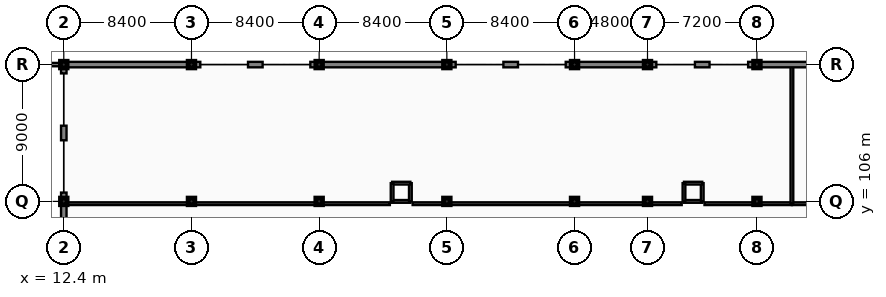
"""IFC4 building model, lengths in metres.
Left out: names, types, materials, properties, quantities, classifications, styles, units other than length and angle.
Written with IfcOpenShell. Run it as: python <this file> out.ifc"""

import sys

from ifc_helpers import new_model, si_unit, direction, frame, frame_2d, origin, origin_2d, place, context, subcontext, project, spatial, rectangle, extrude, element, fill, save


model = new_model("IFC4")
c1 = context("Model", 3, precision=1e-05, world=origin(), true_north=direction((0.0, 1.0)))
c2 = subcontext(c1, "Body", "Model", "MODEL_VIEW")
j1 = project(units=[si_unit("LENGTHUNIT", "METRE"), si_unit("PLANEANGLEUNIT", "RADIAN")], contexts=[c1])
p1 = place(None, origin())
s1 = spatial("IfcSite", under=j1, at=p1, CompositionType="ELEMENT")
p2 = place(p1, origin())
s2 = spatial("IfcBuilding", under=s1, at=p2, CompositionType="ELEMENT")
p3 = place(p2, frame((0.0, 0.0, 9.6)))
s3 = spatial("IfcBuildingStorey", under=s2, at=p3, CompositionType="ELEMENT", Elevation=9.6)
for number, where, z_axis, x_axis in (
    (1, (12.4, 106.0, 0.0), (0.0, 0.0, 1.0), (1.0, 0.0, 0.0)),
    (2, (12.4, 115.0, 0.0), (0.0, 0.0, 1.0), (1.0, 0.0, 0.0)),
    (3, (20.8, 106.0, 0.0), (0.0, 0.0, 1.0), (1.0, 0.0, 0.0)),
    (4, (20.8, 115.0, 0.0), (0.0, 0.0, 1.0), (1.0, 0.0, 0.0)),
    (5, (29.2, 106.0, 0.0), (0.0, 0.0, 1.0), (1.0, 0.0, 0.0)),
    (6, (29.2, 115.0, 0.0), (0.0, 0.0, 1.0), (1.0, 0.0, 0.0)),
    (7, (37.6, 106.0, 0.0), (0.0, 0.0, 1.0), (1.0, 0.0, 0.0)),
    (8, (37.6, 115.0, 0.0), (0.0, 0.0, 1.0), (1.0, 0.0, 0.0)),
    (9, (46.0, 106.0, 0.0), (0.0, 0.0, 1.0), (1.0, 0.0, 0.0)),
    (10, (46.0, 115.0, 0.0), (0.0, 0.0, 1.0), (1.0, 0.0, 0.0)),
    (11, (50.8, 106.0, 0.0), (0.0, 0.0, 1.0), (1.0, 0.0, 0.0)),
    (12, (50.8, 115.0, 0.0), (0.0, 0.0, 1.0), (1.0, 0.0, 0.0)),
    (13, (58.0, 106.0, 0.0), (0.0, 0.0, 1.0), (1.0, 0.0, 0.0)),
    (14, (58.0, 115.0, 0.0), (0.0, 0.0, 1.0), (1.0, 0.0, 0.0)),
):
    element("IfcColumn", number, at=place(p3, frame(where, z_axis=z_axis, x_axis=x_axis)), inside=s3, PredefinedType="COLUMN", context=c2, shape_type="SweptSolid", body=[
        extrude(rectangle(XDim=0.44, YDim=0.44, at=origin_2d()), origin(), (0.0, 0.0, 1.0), 4.2),
    ])
p4 = place(p3, frame((12.54, 105.85, 0.0), z_axis=(0.0, 0.0, 1.0), x_axis=(1.0, 0.0, 0.0)))
e15 = element("IfcWall", 15, at=p4, inside=s3, PredefinedType="PARTITIONING", context=c2, shape_type="SweptSolid", body=[
    extrude(rectangle(XDim=21.31, YDim=0.18, at=frame_2d((10.655, 0.0))), origin(), (0.0, 0.0, 1.0), 3.31),
])
p5 = place(p4, frame((8.87, 0.0, -0.01)))
e16 = element("IfcOpeningElement", 16, at=p5, cuts=e15, PredefinedType="OPENING", context=c2, shape_type="SweptSolid", body=[
    extrude(rectangle(XDim=1.6, YDim=2.21, at=frame_2d((0.8, 1.105))), frame((0.0, 0.1, 0.0), z_axis=(0.0, -1.0, 0.0), x_axis=(1.0, 0.0, 0.0)), (0.0, 0.0, 1.0), 0.2),
])
p6 = place(p3, frame((35.35, 105.85, 0.0), z_axis=(0.0, 0.0, 1.0), x_axis=(1.0, 0.0, 0.0)))
e17 = element("IfcWall", 17, at=p6, inside=s3, PredefinedType="PARTITIONING", context=c2, shape_type="SweptSolid", body=[
    extrude(rectangle(XDim=17.7, YDim=0.18, at=frame_2d((8.85, 0.0))), origin(), (0.0, 0.0, 1.0), 3.25),
])
p7 = place(p3, frame((54.55, 105.85, 0.0), z_axis=(0.0, 0.0, 1.0), x_axis=(1.0, 0.0, 0.0)))
e18 = element("IfcWall", 18, at=p7, inside=s3, PredefinedType="PARTITIONING", context=c2, shape_type="SweptSolid", body=[
    extrude(rectangle(XDim=5.75, YDim=0.18, at=frame_2d((2.875, 0.0))), origin(), (0.0, 0.0, 1.0), 3.25),
])
p8 = place(p3, frame((60.3, 105.85, 0.0), z_axis=(0.0, 0.0, 1.0), x_axis=(1.0, 0.0, 0.0)))
e19 = element("IfcWall", 19, at=p8, inside=s3, PredefinedType="PARTITIONING", context=c2, shape_type="SweptSolid", body=[
    extrude(rectangle(XDim=15.1, YDim=0.18, at=frame_2d((7.55, 0.0))), origin(), (0.0, 0.0, 1.0), 3.25),
])
p9 = place(p8, frame((7.05, 0.0, -0.01)))
e20 = element("IfcOpeningElement", 20, at=p9, cuts=e19, PredefinedType="OPENING", context=c2, shape_type="SweptSolid", body=[
    extrude(rectangle(XDim=1.0, YDim=2.16, at=frame_2d((0.5, 1.08))), frame((0.0, 0.1, 0.0), z_axis=(0.0, -1.0, 0.0), x_axis=(1.0, 0.0, 0.0)), (0.0, 0.0, 1.0), 0.2),
])
p10 = place(p3, frame((60.3, 105.85, 0.0), z_axis=(0.0, 0.0, 1.0), x_axis=(0.0, 1.0, 0.0)))
e21 = element("IfcWall", 21, at=p10, inside=s3, PredefinedType="PARTITIONING", context=c2, shape_type="SweptSolid", body=[
    extrude(rectangle(XDim=9.01, YDim=0.18, at=frame_2d((4.505, 0.0))), origin(), (0.0, 0.0, 1.0), 3.25),
])
p11 = place(p3, frame((20.8, 115.0, 0.0), z_axis=(0.0, 0.0, 1.0), x_axis=(-1.0, 0.0, 0.0)))
e22 = element("IfcWall", 22, at=p11, inside=s3, PredefinedType="SOLIDWALL", context=c2, shape_type="SweptSolid", body=[
    extrude(rectangle(XDim=8.4, YDim=0.36, at=frame_2d((4.2, 0.0))), origin(), (0.0, 0.0, 1.0), 3.31),
])
p12 = place(p11, frame((0.46, 0.0, 0.75)))
e23 = element("IfcOpeningElement", 23, at=p12, cuts=e22, PredefinedType="OPENING", context=c2, shape_type="SweptSolid", body=[
    extrude(rectangle(XDim=1.55, YDim=2.4, at=frame_2d((0.775, 1.2))), frame((0.0, 0.19, 0.0), z_axis=(0.0, -1.0, 0.0), x_axis=(1.0, 0.0, 0.0)), (0.0, 0.0, 1.0), 0.38),
])
p13 = place(p11, frame((6.26, 0.0, 0.75)))
e24 = element("IfcOpeningElement", 24, at=p13, cuts=e22, PredefinedType="OPENING", context=c2, shape_type="SweptSolid", body=[
    extrude(rectangle(XDim=1.55, YDim=2.4, at=frame_2d((0.775, 1.2))), frame((0.0, 0.19, 0.0), z_axis=(0.0, -1.0, 0.0), x_axis=(1.0, 0.0, 0.0)), (0.0, 0.0, 1.0), 0.38),
])
p14 = place(p3, frame((25.48, 115.0, 0.0), z_axis=(0.0, 0.0, 1.0), x_axis=(-1.0, 0.0, 0.0)))
e25 = element("IfcWall", 25, at=p14, inside=s3, PredefinedType="SOLIDWALL", context=c2, shape_type="SweptSolid", body=[
    extrude(rectangle(XDim=0.96, YDim=0.36, at=frame_2d((0.48, 0.0))), origin(), (0.0, 0.0, 1.0), 3.31),
])
for number, where, z_axis, x_axis in (
    (26, (29.07, 115.0, 0.0), (0.0, 0.0, 1.0), (-1.0, 0.0, 0.0)),
    (27, (21.38, 115.0, 0.0), (0.0, 0.0, 1.0), (-1.0, 0.0, 0.0)),
):
    element("IfcWall", number, at=place(p3, frame(where, z_axis=z_axis, x_axis=x_axis)), inside=s3, PredefinedType="SOLIDWALL", context=c2, shape_type="SweptSolid", body=[
        extrude(rectangle(XDim=0.45, YDim=0.36, at=frame_2d((0.225, 0.0))), origin(), (0.0, 0.0, 1.0), 3.31),
    ])
p15 = place(p3, frame((37.6, 115.0, 0.0), z_axis=(0.0, 0.0, 1.0), x_axis=(-1.0, 0.0, 0.0)))
e28 = element("IfcWall", 28, at=p15, inside=s3, PredefinedType="SOLIDWALL", context=c2, shape_type="SweptSolid", body=[
    extrude(rectangle(XDim=8.4, YDim=0.36, at=frame_2d((4.2, 0.0))), origin(), (0.0, 0.0, 1.0), 3.31),
])
p16 = place(p15, frame((0.46, 0.0, 0.75)))
e29 = element("IfcOpeningElement", 29, at=p16, cuts=e28, PredefinedType="OPENING", context=c2, shape_type="SweptSolid", body=[
    extrude(rectangle(XDim=1.55, YDim=2.4, at=frame_2d((0.775, 1.2))), frame((0.0, 0.19, 0.0), z_axis=(0.0, -1.0, 0.0), x_axis=(1.0, 0.0, 0.0)), (0.0, 0.0, 1.0), 0.38),
])
p17 = place(p15, frame((6.26, 0.0, 0.75)))
e30 = element("IfcOpeningElement", 30, at=p17, cuts=e28, PredefinedType="OPENING", context=c2, shape_type="SweptSolid", body=[
    extrude(rectangle(XDim=1.55, YDim=2.4, at=frame_2d((0.775, 1.2))), frame((0.0, 0.19, 0.0), z_axis=(0.0, -1.0, 0.0), x_axis=(1.0, 0.0, 0.0)), (0.0, 0.0, 1.0), 0.38),
])
p18 = place(p3, frame((42.28, 115.0, 0.0), z_axis=(0.0, 0.0, 1.0), x_axis=(-1.0, 0.0, 0.0)))
e31 = element("IfcWall", 31, at=p18, inside=s3, PredefinedType="SOLIDWALL", context=c2, shape_type="SweptSolid", body=[
    extrude(rectangle(XDim=0.96, YDim=0.36, at=frame_2d((0.48, 0.0))), origin(), (0.0, 0.0, 1.0), 3.45),
])
p19 = place(p3, frame((45.87, 115.0, 0.0), z_axis=(0.0, 0.0, 1.0), x_axis=(-1.0, 0.0, 0.0)))
e32 = element("IfcWall", 32, at=p19, inside=s3, PredefinedType="SOLIDWALL", context=c2, shape_type="SweptSolid", body=[
    extrude(rectangle(XDim=0.45, YDim=0.36, at=frame_2d((0.225, 0.0))), origin(), (0.0, 0.0, 1.0), 3.45),
])
p20 = place(p3, frame((38.18, 115.0, 0.0), z_axis=(0.0, 0.0, 1.0), x_axis=(-1.0, 0.0, 0.0)))
e33 = element("IfcWall", 33, at=p20, inside=s3, PredefinedType="SOLIDWALL", context=c2, shape_type="SweptSolid", body=[
    extrude(rectangle(XDim=0.45, YDim=0.36, at=frame_2d((0.225, 0.0))), origin(), (0.0, 0.0, 1.0), 3.45),
])
p21 = place(p3, frame((50.8, 115.0, 0.0), z_axis=(0.0, 0.0, 1.0), x_axis=(-1.0, 0.0, 0.0)))
e34 = element("IfcWall", 34, at=p21, inside=s3, PredefinedType="SOLIDWALL", context=c2, shape_type="SweptSolid", body=[
    extrude(rectangle(XDim=4.8, YDim=0.36, at=frame_2d((2.4, 0.0))), origin(), (0.0, 0.0, 1.0), 3.45),
])
p22 = place(p21, frame((0.46, 0.0, 0.75)))
e35 = element("IfcOpeningElement", 35, at=p22, cuts=e34, PredefinedType="OPENING", context=c2, shape_type="SweptSolid", body=[
    extrude(rectangle(XDim=1.55, YDim=2.4, at=frame_2d((0.775, 1.2))), frame((0.0, 0.19, 0.0), z_axis=(0.0, -1.0, 0.0), x_axis=(1.0, 0.0, 0.0)), (0.0, 0.0, 1.0), 0.38),
])
p23 = place(p21, frame((2.66, 0.0, 0.75)))
e36 = element("IfcOpeningElement", 36, at=p23, cuts=e34, PredefinedType="OPENING", context=c2, shape_type="SweptSolid", body=[
    extrude(rectangle(XDim=1.55, YDim=2.4, at=frame_2d((0.775, 1.2))), frame((0.0, 0.19, 0.0), z_axis=(0.0, -1.0, 0.0), x_axis=(1.0, 0.0, 0.0)), (0.0, 0.0, 1.0), 0.38),
])
p24 = place(p3, frame((54.88, 115.0, 0.0), z_axis=(0.0, 0.0, 1.0), x_axis=(-1.0, 0.0, 0.0)))
e37 = element("IfcWall", 37, at=p24, inside=s3, PredefinedType="SOLIDWALL", context=c2, shape_type="SweptSolid", body=[
    extrude(rectangle(XDim=0.96, YDim=0.36, at=frame_2d((0.48, 0.0))), origin(), (0.0, 0.0, 1.0), 3.45),
])
p25 = place(p3, frame((57.87, 115.0, 0.0), z_axis=(0.0, 0.0, 1.0), x_axis=(-1.0, 0.0, 0.0)))
e38 = element("IfcWall", 38, at=p25, inside=s3, PredefinedType="SOLIDWALL", context=c2, shape_type="SweptSolid", body=[
    extrude(rectangle(XDim=0.45, YDim=0.36, at=frame_2d((0.225, 0.0))), origin(), (0.0, 0.0, 1.0), 3.45),
])
p26 = place(p3, frame((51.38, 115.0, 0.0), z_axis=(0.0, 0.0, 1.0), x_axis=(-1.0, 0.0, 0.0)))
e39 = element("IfcWall", 39, at=p26, inside=s3, PredefinedType="SOLIDWALL", context=c2, shape_type="SweptSolid", body=[
    extrude(rectangle(XDim=0.45, YDim=0.36, at=frame_2d((0.225, 0.0))), origin(), (0.0, 0.0, 1.0), 3.45),
])
p27 = place(p3, frame((65.2, 115.0, 0.0), z_axis=(0.0, 0.0, 1.0), x_axis=(-1.0, 0.0, 0.0)))
e40 = element("IfcWall", 40, at=p27, inside=s3, PredefinedType="SOLIDWALL", context=c2, shape_type="SweptSolid", body=[
    extrude(rectangle(XDim=7.2, YDim=0.36, at=frame_2d((3.6, 0.0))), origin(), (0.0, 0.0, 1.0), 3.45),
])
p28 = place(p27, frame((0.46, 0.0, 0.75)))
e41 = element("IfcOpeningElement", 41, at=p28, cuts=e40, PredefinedType="OPENING", context=c2, shape_type="SweptSolid", body=[
    extrude(rectangle(XDim=1.55, YDim=2.4, at=frame_2d((0.775, 1.2))), frame((0.0, 0.19, 0.0), z_axis=(0.0, -1.0, 0.0), x_axis=(1.0, 0.0, 0.0)), (0.0, 0.0, 1.0), 0.38),
])
p29 = place(p27, frame((3.06, 0.0, 0.75)))
e42 = element("IfcOpeningElement", 42, at=p29, cuts=e40, PredefinedType="OPENING", context=c2, shape_type="SweptSolid", body=[
    extrude(rectangle(XDim=1.55, YDim=2.4, at=frame_2d((0.775, 1.2))), frame((0.0, 0.19, 0.0), z_axis=(0.0, -1.0, 0.0), x_axis=(1.0, 0.0, 0.0)), (0.0, 0.0, 1.0), 0.38),
])
p30 = place(p3, frame((12.4, 106.0, 0.0), z_axis=(0.0, 0.0, 1.0), x_axis=(0.0, -1.0, 0.0)))
e43 = element("IfcWall", 43, at=p30, inside=s3, PredefinedType="SOLIDWALL", context=c2, shape_type="SweptSolid", body=[
    extrude(rectangle(XDim=8.4, YDim=0.36, at=frame_2d((4.2, 0.0))), origin(), (0.0, 0.0, 1.0), 3.31),
])
p31 = place(p30, frame((0.46, 0.0, 0.75)))
e44 = element("IfcOpeningElement", 44, at=p31, cuts=e43, PredefinedType="OPENING", context=c2, shape_type="SweptSolid", body=[
    extrude(rectangle(XDim=1.55, YDim=2.4, at=frame_2d((0.775, 1.2))), frame((0.0, 0.19, 0.0), z_axis=(0.0, -1.0, 0.0), x_axis=(1.0, 0.0, 0.0)), (0.0, 0.0, 1.0), 0.38),
])
p32 = place(p30, frame((6.26, 0.0, 0.75)))
e45 = element("IfcOpeningElement", 45, at=p32, cuts=e43, PredefinedType="OPENING", context=c2, shape_type="SweptSolid", body=[
    extrude(rectangle(XDim=1.55, YDim=2.4, at=frame_2d((0.775, 1.2))), frame((0.0, 0.19, 0.0), z_axis=(0.0, -1.0, 0.0), x_axis=(1.0, 0.0, 0.0)), (0.0, 0.0, 1.0), 0.38),
])
p33 = place(p3, frame((12.4, 110.98, 0.0), z_axis=(0.0, 0.0, 1.0), x_axis=(0.0, -1.0, 0.0)))
e46 = element("IfcWall", 46, at=p33, inside=s3, PredefinedType="SOLIDWALL", context=c2, shape_type="SweptSolid", body=[
    extrude(rectangle(XDim=0.96, YDim=0.36, at=frame_2d((0.48, 0.0))), origin(), (0.0, 0.0, 1.0), 3.31),
])
for number, where, z_axis, x_axis in (
    (47, (12.4, 114.87, 0.0), (0.0, 0.0, 1.0), (0.0, -1.0, 0.0)),
    (48, (12.4, 106.58, 0.0), (0.0, 0.0, 1.0), (0.0, -1.0, 0.0)),
):
    element("IfcWall", number, at=place(p3, frame(where, z_axis=z_axis, x_axis=x_axis)), inside=s3, PredefinedType="SOLIDWALL", context=c2, shape_type="SweptSolid", body=[
        extrude(rectangle(XDim=0.45, YDim=0.36, at=frame_2d((0.225, 0.0))), origin(), (0.0, 0.0, 1.0), 3.31),
    ])
p34 = place(p3, frame((4.0, 115.0, 0.0), z_axis=(0.0, 0.0, 1.0), x_axis=(1.0, 0.0, 0.0)))
e49 = element("IfcWall", 49, at=p34, inside=s3, PredefinedType="PARAPET", context=c2, shape_type="SweptSolid", body=[
    extrude(rectangle(XDim=8.22, YDim=0.22, at=frame_2d((4.11, 0.0))), origin(), (0.0, 0.0, 1.0), 1.2),
])
p35 = place(p3, frame((34.0, 106.0, 0.0), z_axis=(0.0, 0.0, 1.0), x_axis=(1.0, 0.0, 0.0)))
e50 = element("IfcWall", 50, at=p35, inside=s3, PredefinedType="SOLIDWALL", context=c2, shape_type="SweptSolid", body=[
    extrude(rectangle(XDim=1.2, YDim=0.18, at=frame_2d((0.6, 0.0))), origin(), (0.0, 0.0, 1.0), 3.97),
])
p36 = place(p35, frame((0.2, 0.0, -0.01)))
e51 = element("IfcOpeningElement", 51, at=p36, cuts=e50, PredefinedType="OPENING", context=c2, shape_type="SweptSolid", body=[
    extrude(rectangle(XDim=0.8, YDim=2.06, at=frame_2d((0.4, 1.03))), frame((0.0, 0.1, 0.0), z_axis=(0.0, -1.0, 0.0), x_axis=(1.0, 0.0, 0.0)), (0.0, 0.0, 1.0), 0.2),
])
for number, where, z_axis, x_axis in (
    (52, (35.2, 106.0, 0.0), (0.0, 0.0, 1.0), (0.0, 1.0, 0.0)),
    (53, (35.2, 107.2, 0.0), (0.0, 0.0, 1.0), (-1.0, 0.0, 0.0)),
    (54, (34.0, 107.2, 0.0), (0.0, 0.0, 1.0), (0.0, -1.0, 0.0)),
):
    element("IfcWall", number, at=place(p3, frame(where, z_axis=z_axis, x_axis=x_axis)), inside=s3, PredefinedType="SOLIDWALL", context=c2, shape_type="SweptSolid", body=[
        extrude(rectangle(XDim=1.2, YDim=0.18, at=frame_2d((0.6, 0.0))), origin(), (0.0, 0.0, 1.0), 3.97),
    ])
p37 = place(p3, frame((53.2, 106.0, 0.0), z_axis=(0.0, 0.0, 1.0), x_axis=(1.0, 0.0, 0.0)))
e55 = element("IfcWall", 55, at=p37, inside=s3, PredefinedType="SOLIDWALL", context=c2, shape_type="SweptSolid", body=[
    extrude(rectangle(XDim=1.2, YDim=0.18, at=frame_2d((0.6, 0.0))), origin(), (0.0, 0.0, 1.0), 3.97),
])
p38 = place(p37, frame((0.2, 0.0, -0.01)))
e56 = element("IfcOpeningElement", 56, at=p38, cuts=e55, PredefinedType="OPENING", context=c2, shape_type="SweptSolid", body=[
    extrude(rectangle(XDim=0.8, YDim=2.06, at=frame_2d((0.4, 1.03))), frame((0.0, 0.1, 0.0), z_axis=(0.0, -1.0, 0.0), x_axis=(1.0, 0.0, 0.0)), (0.0, 0.0, 1.0), 0.2),
])
for number, where, z_axis, x_axis in (
    (57, (54.4, 106.0, 0.0), (0.0, 0.0, 1.0), (0.0, 1.0, 0.0)),
    (58, (54.4, 107.2, 0.0), (0.0, 0.0, 1.0), (-1.0, 0.0, 0.0)),
    (59, (53.2, 107.2, 0.0), (0.0, 0.0, 1.0), (0.0, -1.0, 0.0)),
):
    element("IfcWall", number, at=place(p3, frame(where, z_axis=z_axis, x_axis=x_axis)), inside=s3, PredefinedType="SOLIDWALL", context=c2, shape_type="SweptSolid", body=[
        extrude(rectangle(XDim=1.2, YDim=0.18, at=frame_2d((0.6, 0.0))), origin(), (0.0, 0.0, 1.0), 3.97),
    ])
p39 = place(p5, frame((0.0, 0.0, 0.01)))
e60 = element("IfcDoor", 60, at=p39, inside=s3, OperationType="DOUBLE_SWING_LEFT", PredefinedType="DOOR", context=c2, shape_type="SweptSolid", body=[
    extrude(rectangle(XDim=1.6, YDim=2.2, at=frame_2d((0.8, 1.1))), frame((0.0, 0.025, 0.0), z_axis=(0.0, -1.0, 0.0), x_axis=(1.0, 0.0, 0.0)), (0.0, 0.0, 1.0), 0.05),
])
fill(e16, e60)
p40 = place(p12, origin())
e61 = element("IfcWindow", 61, at=p40, inside=s3, PartitioningType="DOUBLE_PANEL_HORIZONTAL", PredefinedType="WINDOW", context=c2, shape_type="SweptSolid", body=[
    extrude(rectangle(XDim=1.55, YDim=2.4, at=frame_2d((0.775, 1.2))), frame((0.0, 0.03, 0.0), z_axis=(0.0, -1.0, 0.0), x_axis=(1.0, 0.0, 0.0)), (0.0, 0.0, 1.0), 0.06),
])
fill(e23, e61)
p41 = place(p13, origin())
e62 = element("IfcWindow", 62, at=p41, inside=s3, PartitioningType="DOUBLE_PANEL_HORIZONTAL", PredefinedType="WINDOW", context=c2, shape_type="SweptSolid", body=[
    extrude(rectangle(XDim=1.55, YDim=2.4, at=frame_2d((0.775, 1.2))), frame((0.0, 0.03, 0.0), z_axis=(0.0, -1.0, 0.0), x_axis=(1.0, 0.0, 0.0)), (0.0, 0.0, 1.0), 0.06),
])
fill(e24, e62)
p42 = place(p16, origin())
e63 = element("IfcWindow", 63, at=p42, inside=s3, PartitioningType="DOUBLE_PANEL_HORIZONTAL", PredefinedType="WINDOW", context=c2, shape_type="SweptSolid", body=[
    extrude(rectangle(XDim=1.55, YDim=2.4, at=frame_2d((0.775, 1.2))), frame((0.0, 0.03, 0.0), z_axis=(0.0, -1.0, 0.0), x_axis=(1.0, 0.0, 0.0)), (0.0, 0.0, 1.0), 0.06),
])
fill(e29, e63)
p43 = place(p17, origin())
e64 = element("IfcWindow", 64, at=p43, inside=s3, PartitioningType="DOUBLE_PANEL_HORIZONTAL", PredefinedType="WINDOW", context=c2, shape_type="SweptSolid", body=[
    extrude(rectangle(XDim=1.55, YDim=2.4, at=frame_2d((0.775, 1.2))), frame((0.0, 0.03, 0.0), z_axis=(0.0, -1.0, 0.0), x_axis=(1.0, 0.0, 0.0)), (0.0, 0.0, 1.0), 0.06),
])
fill(e30, e64)
p44 = place(p22, origin())
e65 = element("IfcWindow", 65, at=p44, inside=s3, PartitioningType="DOUBLE_PANEL_HORIZONTAL", PredefinedType="WINDOW", context=c2, shape_type="SweptSolid", body=[
    extrude(rectangle(XDim=1.55, YDim=2.4, at=frame_2d((0.775, 1.2))), frame((0.0, 0.03, 0.0), z_axis=(0.0, -1.0, 0.0), x_axis=(1.0, 0.0, 0.0)), (0.0, 0.0, 1.0), 0.06),
])
fill(e35, e65)
p45 = place(p23, origin())
e66 = element("IfcWindow", 66, at=p45, inside=s3, PartitioningType="DOUBLE_PANEL_HORIZONTAL", PredefinedType="WINDOW", context=c2, shape_type="SweptSolid", body=[
    extrude(rectangle(XDim=1.55, YDim=2.4, at=frame_2d((0.775, 1.2))), frame((0.0, 0.03, 0.0), z_axis=(0.0, -1.0, 0.0), x_axis=(1.0, 0.0, 0.0)), (0.0, 0.0, 1.0), 0.06),
])
fill(e36, e66)
p46 = place(p29, origin())
e67 = element("IfcWindow", 67, at=p46, inside=s3, PartitioningType="DOUBLE_PANEL_HORIZONTAL", PredefinedType="WINDOW", context=c2, shape_type="SweptSolid", body=[
    extrude(rectangle(XDim=1.55, YDim=2.4, at=frame_2d((0.775, 1.2))), frame((0.0, 0.03, 0.0), z_axis=(0.0, -1.0, 0.0), x_axis=(1.0, 0.0, 0.0)), (0.0, 0.0, 1.0), 0.06),
])
fill(e42, e67)
p47 = place(p31, origin())
e68 = element("IfcWindow", 68, at=p47, inside=s3, PartitioningType="DOUBLE_PANEL_HORIZONTAL", PredefinedType="WINDOW", context=c2, shape_type="SweptSolid", body=[
    extrude(rectangle(XDim=1.55, YDim=2.4, at=frame_2d((0.775, 1.2))), frame((0.0, 0.03, 0.0), z_axis=(0.0, -1.0, 0.0), x_axis=(1.0, 0.0, 0.0)), (0.0, 0.0, 1.0), 0.06),
])
fill(e44, e68)
p48 = place(p36, frame((0.0, 0.0, 0.01)))
e69 = element("IfcDoor", 69, at=p48, inside=s3, OperationType="SINGLE_SWING_LEFT", PredefinedType="DOOR", context=c2, shape_type="SweptSolid", body=[
    extrude(rectangle(XDim=0.8, YDim=2.05, at=frame_2d((0.4, 1.025))), frame((0.0, 0.025, 0.0), z_axis=(0.0, -1.0, 0.0), x_axis=(1.0, 0.0, 0.0)), (0.0, 0.0, 1.0), 0.05),
])
fill(e51, e69)
p49 = place(p38, frame((0.0, 0.0, 0.01)))
e70 = element("IfcDoor", 70, at=p49, inside=s3, OperationType="SINGLE_SWING_RIGHT", PredefinedType="DOOR", context=c2, shape_type="SweptSolid", body=[
    extrude(rectangle(XDim=0.8, YDim=2.05, at=frame_2d((0.4, 1.025))), frame((0.0, 0.025, 0.0), z_axis=(0.0, -1.0, 0.0), x_axis=(1.0, 0.0, 0.0)), (0.0, 0.0, 1.0), 0.05),
])
fill(e56, e70)
save(model, sys.argv[1])
